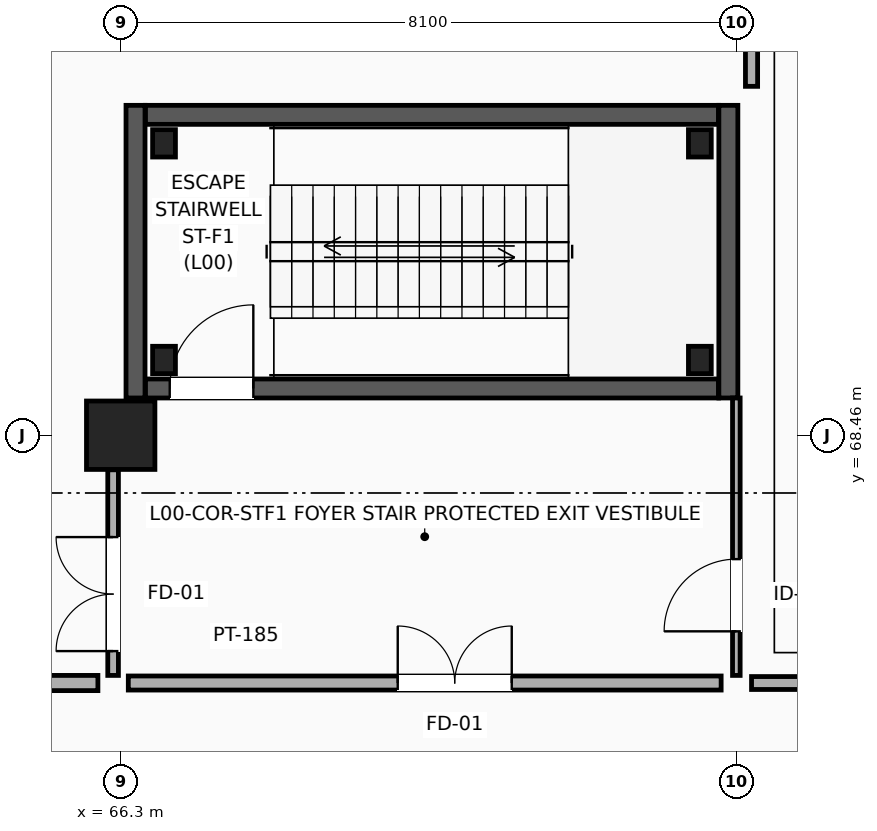
"""IFC4 building model, lengths in metres.
Left out: names, types, materials, properties, quantities, classifications, styles, units other than length and angle.
Written with IfcOpenShell. Run it as: python <this file> out.ifc"""

import sys

from ifc_helpers import new_model, si_unit, direction, frame, frame_2d, origin, origin_2d, place, context, subcontext, project, spatial, rectangle, i_section, extrude, element, fill, save


model = new_model("IFC4")
c1 = context("Model", 3, precision=1e-05, world=origin(), true_north=direction((0.0, 1.0)))
c2 = subcontext(c1, "Body", "Model", "MODEL_VIEW")
j1 = project(units=[si_unit("LENGTHUNIT", "METRE"), si_unit("PLANEANGLEUNIT", "RADIAN")], contexts=[c1])
p1 = place(None, origin())
s1 = spatial("IfcSite", under=j1, at=p1, CompositionType="ELEMENT")
p2 = place(p1, origin())
s2 = spatial("IfcBuilding", under=s1, at=p2, CompositionType="ELEMENT")
p3 = place(p2, origin())
s3 = spatial("IfcBuildingStorey", under=s2, at=p3, CompositionType="ELEMENT", Elevation=0.0)
for number, where, z_axis, x_axis in (
    (1, (66.87, 69.45, 0.0), (0.0, 0.0, 1.0), (1.0, 0.0, 0.0)),
    (2, (66.87, 72.3, 0.0), (0.0, 0.0, 1.0), (1.0, 0.0, 0.0)),
    (3, (73.92, 69.45, 0.0), (0.0, 0.0, 1.0), (1.0, 0.0, 0.0)),
    (4, (73.92, 72.3, 0.0), (0.0, 0.0, 1.0), (1.0, 0.0, 0.0)),
):
    element("IfcColumn", number, at=place(p3, frame(where, z_axis=z_axis, x_axis=x_axis)), inside=s3, PredefinedType="COLUMN", context=c2, shape_type="SweptSolid", body=[
        extrude(i_section(OverallWidth=0.3, OverallDepth=0.36, WebThickness=0.012, FlangeThickness=0.022, FilletRadius=0.027, at=origin_2d()), origin(), (0.0, 0.0, 1.0), 5.4),
    ])
p4 = place(p3, frame((66.3, 68.46, 0.0), z_axis=(0.0, 0.0, 1.0), x_axis=(1.0, 0.0, 0.0)))
e5 = element("IfcColumn", 5, at=p4, inside=s3, PredefinedType="COLUMN", context=c2, shape_type="SweptSolid", body=[
    extrude(rectangle(XDim=0.9, YDim=0.9, at=origin_2d()), origin(), (0.0, 0.0, 1.0), 5.4),
])
p5 = place(p3, frame((66.625, 69.075, 0.0), z_axis=(0.0, 0.0, 1.0), x_axis=(1.0, 0.0, 0.0)))
e6 = element("IfcWall", 6, at=p5, inside=s3, PredefinedType="SHEAR", context=c2, shape_type="SweptSolid", body=[
    extrude(rectangle(XDim=7.54, YDim=0.25, at=frame_2d((3.77, 0.0))), origin(), (0.0, 0.0, 1.0), 5.105),
])
p6 = place(p5, frame((0.32, 0.0, 0.0)))
e7 = element("IfcOpeningElement", 7, at=p6, cuts=e6, PredefinedType="OPENING", context=c2, shape_type="SweptSolid", body=[
    extrude(rectangle(XDim=1.1, YDim=2.2, at=frame_2d((0.55, 1.1))), frame((0.0, 0.135, 0.0), z_axis=(0.0, -1.0, 0.0), x_axis=(1.0, 0.0, 0.0)), (0.0, 0.0, 1.0), 0.27),
])
p7 = place(p3, frame((66.625, 72.675, 0.0), z_axis=(0.0, 0.0, 1.0), x_axis=(1.0, 0.0, 0.0)))
e8 = element("IfcWall", 8, at=p7, inside=s3, PredefinedType="SHEAR", context=c2, shape_type="SweptSolid", body=[
    extrude(rectangle(XDim=7.54, YDim=0.25, at=frame_2d((3.77, 0.0))), origin(), (0.0, 0.0, 1.0), 5.105),
])
for number, where, z_axis, x_axis in (
    (9, (66.495, 68.95, 0.0), (0.0, 0.0, 1.0), (0.0, 1.0, 0.0)),
    (10, (74.295, 68.95, 0.0), (0.0, 0.0, 1.0), (0.0, 1.0, 0.0)),
):
    element("IfcWall", number, at=place(p3, frame(where, z_axis=z_axis, x_axis=x_axis)), inside=s3, PredefinedType="SHEAR", context=c2, shape_type="SweptSolid", body=[
        extrude(rectangle(XDim=3.85, YDim=0.25, at=frame_2d((1.925, 0.0))), origin(), (0.0, 0.0, 1.0), 5.105),
    ])
p8 = place(p3, frame((58.4, 65.2, 0.0), z_axis=(0.0, 0.0, 1.0), x_axis=(1.0, 0.0, 0.0)))
e11 = element("IfcWall", 11, at=p8, inside=s3, PredefinedType="PARTITIONING", context=c2, shape_type="SweptSolid", body=[
    extrude(rectangle(XDim=7.6, YDim=0.2, at=frame_2d((3.8, 0.0))), origin(), (0.0, 0.0, 1.0), 4.787),
])
p9 = place(p8, frame((3.149, 0.0, 0.0)))
e12 = element("IfcOpeningElement", 12, at=p9, cuts=e11, PredefinedType="OPENING", context=c2, shape_type="SweptSolid", body=[
    extrude(rectangle(XDim=1.5, YDim=2.2, at=frame_2d((0.75, 1.1))), frame((0.0, 0.11, 0.0), z_axis=(0.0, -1.0, 0.0), x_axis=(1.0, 0.0, 0.0)), (0.0, 0.0, 1.0), 0.22),
])
p10 = place(p3, frame((66.4, 65.2, 0.0), z_axis=(0.0, 0.0, 1.0), x_axis=(1.0, 0.0, 0.0)))
e13 = element("IfcWall", 13, at=p10, inside=s3, PredefinedType="PARTITIONING", context=c2, shape_type="SweptSolid", body=[
    extrude(rectangle(XDim=7.8, YDim=0.185, at=frame_2d((3.9, 0.0))), origin(), (0.0, 0.0, 1.0), 4.037),
])
p11 = place(p10, frame((3.545, 0.0, 0.0)))
e14 = element("IfcOpeningElement", 14, at=p11, cuts=e13, PredefinedType="OPENING", context=c2, shape_type="SweptSolid", body=[
    extrude(rectangle(XDim=1.5, YDim=2.2, at=frame_2d((0.75, 1.1))), frame((0.0, 0.103, 0.0), z_axis=(0.0, -1.0, 0.0), x_axis=(1.0, 0.0, 0.0)), (0.0, 0.0, 1.0), 0.205),
])
p12 = place(p3, frame((74.6, 65.2, 0.0), z_axis=(0.0, 0.0, 1.0), x_axis=(1.0, 0.0, 0.0)))
e15 = element("IfcWall", 15, at=p12, inside=s3, PredefinedType="PARTITIONING", context=c2, shape_type="SweptSolid", body=[
    extrude(rectangle(XDim=15.6, YDim=0.17, at=frame_2d((7.8, 0.0))), origin(), (0.0, 0.0, 1.0), 4.037),
])
p13 = place(p12, frame((11.172, 0.0, 0.0)))
e16 = element("IfcOpeningElement", 16, at=p13, cuts=e15, PredefinedType="OPENING", context=c2, shape_type="SweptSolid", body=[
    extrude(rectangle(XDim=1.45, YDim=2.3, at=frame_2d((0.725, 1.15))), frame((0.0, 0.095, 0.0), z_axis=(0.0, -1.0, 0.0), x_axis=(1.0, 0.0, 0.0)), (0.0, 0.0, 1.0), 0.19),
])
p14 = place(p3, frame((66.2, 65.3, 0.0), z_axis=(0.0, 0.0, 1.0), x_axis=(0.0, 1.0, 0.0)))
e17 = element("IfcWall", 17, at=p14, inside=s3, PredefinedType="PARTITIONING", context=c2, shape_type="SweptSolid", body=[
    extrude(rectangle(XDim=2.705, YDim=0.14, at=frame_2d((1.353, 0.0))), origin(), (0.0, 0.0, 1.0), 4.037),
])
p15 = place(p14, frame((0.32, 0.0, 0.0)))
e18 = element("IfcOpeningElement", 18, at=p15, cuts=e17, PredefinedType="OPENING", context=c2, shape_type="SweptSolid", body=[
    extrude(rectangle(XDim=1.5, YDim=2.2, at=frame_2d((0.75, 1.1))), frame((0.0, 0.08, 0.0), z_axis=(0.0, -1.0, 0.0), x_axis=(1.0, 0.0, 0.0)), (0.0, 0.0, 1.0), 0.16),
])
p16 = place(p3, frame((74.4, 65.3, 0.0), z_axis=(0.0, 0.0, 1.0), x_axis=(0.0, 1.0, 0.0)))
e19 = element("IfcWall", 19, at=p16, inside=s3, PredefinedType="PARTITIONING", context=c2, shape_type="SweptSolid", body=[
    extrude(rectangle(XDim=3.65, YDim=0.1, at=frame_2d((1.825, 0.0))), origin(), (0.0, 0.0, 1.0), 3.887),
])
p17 = place(p16, frame((0.58, 0.0, 0.0)))
e20 = element("IfcOpeningElement", 20, at=p17, cuts=e19, PredefinedType="OPENING", context=c2, shape_type="SweptSolid", body=[
    extrude(rectangle(XDim=0.95, YDim=2.15, at=frame_2d((0.475, 1.075))), frame((0.0, 0.06, 0.0), z_axis=(0.0, -1.0, 0.0), x_axis=(1.0, 0.0, 0.0)), (0.0, 0.0, 1.0), 0.12),
])
p18 = place(p3, frame((74.6, 73.05, 0.0), z_axis=(0.0, 0.0, 1.0), x_axis=(0.0, 1.0, 0.0)))
e21 = element("IfcWall", 21, at=p18, inside=s3, PredefinedType="PARTITIONING", context=c2, shape_type="SweptSolid", body=[
    extrude(rectangle(XDim=9.75, YDim=0.16, at=frame_2d((4.875, 0.0))), origin(), (0.0, 0.0, 1.0), 3.887),
])
p19 = place(p6, origin())
e22 = element("IfcDoor", 22, at=p19, inside=s3, OperationType="SINGLE_SWING_RIGHT", PredefinedType="DOOR", context=c2, shape_type="SweptSolid", body=[
    extrude(rectangle(XDim=1.1, YDim=2.2, at=frame_2d((0.55, 1.1))), frame((0.0, 0.025, 0.0), z_axis=(0.0, -1.0, 0.0), x_axis=(1.0, 0.0, 0.0)), (0.0, 0.0, 1.0), 0.05),
])
fill(e7, e22)
p20 = place(p11, origin())
e23 = element("IfcDoor", 23, at=p20, inside=s3, OperationType="DOUBLE_DOOR_SINGLE_SWING", PredefinedType="DOOR", context=c2, shape_type="SweptSolid", body=[
    extrude(rectangle(XDim=1.5, YDim=2.2, at=frame_2d((0.75, 1.1))), frame((0.0, 0.025, 0.0), z_axis=(0.0, -1.0, 0.0), x_axis=(1.0, 0.0, 0.0)), (0.0, 0.0, 1.0), 0.05),
])
fill(e14, e23)
p21 = place(p15, origin())
e24 = element("IfcDoor", 24, at=p21, inside=s3, OperationType="DOUBLE_DOOR_SINGLE_SWING", PredefinedType="DOOR", context=c2, shape_type="SweptSolid", body=[
    extrude(rectangle(XDim=1.5, YDim=2.2, at=frame_2d((0.75, 1.1))), frame((0.0, 0.025, 0.0), z_axis=(0.0, -1.0, 0.0), x_axis=(1.0, 0.0, 0.0)), (0.0, 0.0, 1.0), 0.05),
])
fill(e18, e24)
p22 = place(p17, origin())
e25 = element("IfcDoor", 25, at=p22, inside=s3, OperationType="SINGLE_SWING_LEFT", PredefinedType="DOOR", context=c2, shape_type="SweptSolid", body=[
    extrude(rectangle(XDim=0.95, YDim=2.15, at=frame_2d((0.475, 1.075))), frame((0.0, 0.025, 0.0), z_axis=(0.0, -1.0, 0.0), x_axis=(1.0, 0.0, 0.0)), (0.0, 0.0, 1.0), 0.05),
])
fill(e20, e25)
save(model, sys.argv[1])
